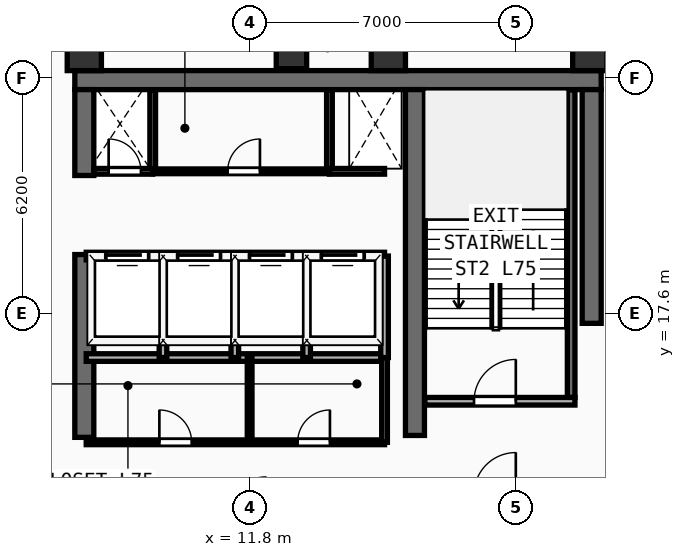
"""IFC4 building model, lengths in metres.
Left out: names, types, materials, properties, quantities, classifications, styles, units other than length and angle.
Written with IfcOpenShell. Run it as: python <this file> out.ifc"""

import sys

from ifc_helpers import new_model, si_unit, direction, frame, frame_2d, origin, origin_2d, place, context, subcontext, project, spatial, rectangle, extrude, element, fill, save


model = new_model("IFC4")
c1 = context("Model", 3, precision=1e-05, world=origin(), true_north=direction((0.0, 1.0)))
c2 = subcontext(c1, "Body", "Model", "MODEL_VIEW")
j1 = project(units=[si_unit("LENGTHUNIT", "METRE"), si_unit("PLANEANGLEUNIT", "RADIAN")], contexts=[c1])
p1 = place(None, origin())
s1 = spatial("IfcSite", under=j1, at=p1, CompositionType="ELEMENT")
p2 = place(p1, origin())
s2 = spatial("IfcBuilding", under=s1, at=p2, CompositionType="ELEMENT")
p3 = place(p2, frame((0.0, 0.0, 293.2)))
s3 = spatial("IfcBuildingStorey", under=s2, at=p3, CompositionType="ELEMENT", Elevation=293.2)
p4 = place(p3, frame((7.2, 23.75, 0.0), z_axis=(0.0, 0.0, 1.0), x_axis=(1.0, 0.0, 0.0)))
e1 = element("IfcWall", 1, at=p4, inside=s3, PredefinedType="SHEAR", context=c2, shape_type="SweptSolid", body=[
    extrude(rectangle(XDim=13.85, YDim=0.5, at=frame_2d((6.925, 0.0))), origin(), (0.0, 0.0, 1.0), 3.56),
])
p5 = place(p3, frame((7.45, 14.35, 0.0), z_axis=(0.0, 0.0, 1.0), x_axis=(0.0, 1.0, 0.0)))
e2 = element("IfcWall", 2, at=p5, inside=s3, PredefinedType="SHEAR", context=c2, shape_type="SweptSolid", body=[
    extrude(rectangle(XDim=4.81, YDim=0.5, at=frame_2d((2.405, 0.0))), origin(), (0.0, 0.0, 1.0), 3.56),
])
p6 = place(p3, frame((7.45, 21.24, 0.0), z_axis=(0.0, 0.0, 1.0), x_axis=(0.0, 1.0, 0.0)))
e3 = element("IfcWall", 3, at=p6, inside=s3, PredefinedType="SHEAR", context=c2, shape_type="SweptSolid", body=[
    extrude(rectangle(XDim=2.26, YDim=0.5, at=frame_2d((1.13, 0.0))), origin(), (0.0, 0.0, 1.0), 3.56),
])
p7 = place(p3, frame((20.8, 17.35, 0.0), z_axis=(0.0, 0.0, 1.0), x_axis=(0.0, 1.0, 0.0)))
e4 = element("IfcWall", 4, at=p7, inside=s3, PredefinedType="SHEAR", context=c2, shape_type="SweptSolid", body=[
    extrude(rectangle(XDim=6.15, YDim=0.5, at=frame_2d((3.075, 0.0))), origin(), (0.0, 0.0, 1.0), 3.56),
])
p8 = place(p3, frame((16.15, 14.4, 0.0), z_axis=(0.0, 0.0, 1.0), x_axis=(0.0, 1.0, 0.0)))
e5 = element("IfcWall", 5, at=p8, inside=s3, PredefinedType="SHEAR", context=c2, shape_type="SweptSolid", body=[
    extrude(rectangle(XDim=9.1, YDim=0.5, at=frame_2d((4.55, 0.0))), origin(), (0.0, 0.0, 1.0), 3.56),
])
for number, where, z_axis, x_axis in (
    (6, (7.45, 24.45, 0.0), (0.0, 0.0, 1.0), (1.0, 0.0, 0.0)),
    (7, (15.45, 24.45, 0.0), (0.0, 0.0, 1.0), (1.0, 0.0, 0.0)),
    (8, (20.75, 24.45, 0.0), (0.0, 0.0, 1.0), (1.0, 0.0, 0.0)),
):
    element("IfcColumn", number, at=place(p3, frame(where, z_axis=z_axis, x_axis=x_axis)), inside=s3, PredefinedType="COLUMN", context=c2, shape_type="SweptSolid", body=[
        extrude(rectangle(XDim=0.9, YDim=0.9, at=origin_2d()), origin(), (0.0, 0.0, 1.0), 3.56),
    ])
p9 = place(p3, frame((12.9, 24.45, 0.0), z_axis=(0.0, 0.0, 1.0), x_axis=(1.0, 0.0, 0.0)))
e9 = element("IfcColumn", 9, at=p9, inside=s3, PredefinedType="COLUMN", context=c2, shape_type="SweptSolid", body=[
    extrude(rectangle(XDim=0.8, YDim=0.8, at=origin_2d()), origin(), (0.0, 0.0, 1.0), 3.56),
])
p10 = place(p3, frame((27.601, 19.691, 0.0), z_axis=(0.0, 0.0, 1.0), x_axis=(-0.707120040392, 0.707093521733, 0.0)))
e10 = element("IfcWall", 10, at=p10, inside=s3, PredefinedType="SOLIDWALL", context=c2, shape_type="SweptSolid", body=[
    extrude(rectangle(XDim=9.206, YDim=0.28, at=frame_2d((4.603, 0.0))), origin(), (0.0, 0.0, 1.0), 3.56),
])
p11 = place(p3, frame((20.26, 15.4, 0.0), z_axis=(0.0, 0.0, 1.0), x_axis=(0.0, 1.0, 0.0)))
e11 = element("IfcWall", 11, at=p11, inside=s3, PredefinedType="SHEAR", context=c2, shape_type="SweptSolid", body=[
    extrude(rectangle(XDim=8.09, YDim=0.2, at=frame_2d((4.045, 0.0))), origin(), (0.0, 0.0, 1.0), 3.56),
])
p12 = place(p3, frame((16.41, 15.3, 0.0), z_axis=(0.0, 0.0, 1.0), x_axis=(1.0, 0.0, 0.0)))
e12 = element("IfcWall", 12, at=p12, inside=s3, PredefinedType="PARTITIONING", context=c2, shape_type="SweptSolid", body=[
    extrude(rectangle(XDim=3.95, YDim=0.2, at=frame_2d((1.975, 0.0))), origin(), (0.0, 0.0, 1.0), 3.56),
])
p13 = place(p12, frame((1.294, 0.0, 0.0)))
e13 = element("IfcOpeningElement", 13, at=p13, cuts=e12, PredefinedType="OPENING", context=c2, shape_type="SweptSolid", body=[
    extrude(rectangle(XDim=1.1, YDim=2.2, at=frame_2d((0.55, 1.1))), frame((0.0, 0.11, 0.0), z_axis=(0.0, -1.0, 0.0), x_axis=(1.0, 0.0, 0.0)), (0.0, 0.0, 1.0), 0.22),
])
p14 = place(p3, frame((7.5, 16.45, 0.0), z_axis=(0.0, 0.0, 1.0), x_axis=(1.0, 0.0, 0.0)))
e14 = element("IfcWall", 14, at=p14, inside=s3, PredefinedType="PARTITIONING", context=c2, shape_type="SweptSolid", body=[
    extrude(rectangle(XDim=7.85, YDim=0.2, at=frame_2d((3.925, 0.0))), origin(), (0.0, 0.0, 1.0), 3.56),
])
p15 = place(p3, frame((7.5, 14.22, 0.0), z_axis=(0.0, 0.0, 1.0), x_axis=(1.0, 0.0, 0.0)))
e15 = element("IfcWall", 15, at=p15, inside=s3, PredefinedType="PARTITIONING", context=c2, shape_type="SweptSolid", body=[
    extrude(rectangle(XDim=7.85, YDim=0.125, at=frame_2d((3.925, 0.0))), origin(), (0.0, 0.0, 1.0), 3.56),
])
p16 = place(p15, frame((1.925, 0.0, 0.0)))
e16 = element("IfcOpeningElement", 16, at=p16, cuts=e15, PredefinedType="OPENING", context=c2, shape_type="SweptSolid", body=[
    extrude(rectangle(XDim=0.85, YDim=2.15, at=frame_2d((0.425, 1.075))), frame((0.0, 0.073, 0.0), z_axis=(0.0, -1.0, 0.0), x_axis=(1.0, 0.0, 0.0)), (0.0, 0.0, 1.0), 0.145),
])
p17 = place(p15, frame((5.563, 0.0, 0.0)))
e17 = element("IfcOpeningElement", 17, at=p17, cuts=e15, PredefinedType="OPENING", context=c2, shape_type="SweptSolid", body=[
    extrude(rectangle(XDim=0.85, YDim=2.15, at=frame_2d((0.425, 1.075))), frame((0.0, 0.073, 0.0), z_axis=(0.0, -1.0, 0.0), x_axis=(1.0, 0.0, 0.0)), (0.0, 0.0, 1.0), 0.145),
])
p18 = place(p3, frame((15.35, 14.22, 0.0), z_axis=(0.0, 0.0, 1.0), x_axis=(0.0, 1.0, 0.0)))
e18 = element("IfcWall", 18, at=p18, inside=s3, PredefinedType="PARTITIONING", context=c2, shape_type="SweptSolid", body=[
    extrude(rectangle(XDim=2.23, YDim=0.15, at=frame_2d((1.115, 0.0))), origin(), (0.0, 0.0, 1.0), 3.56),
])
p19 = place(p3, frame((11.8, 14.22, 0.0), z_axis=(0.0, 0.0, 1.0), x_axis=(0.0, 1.0, 0.0)))
e19 = element("IfcWall", 19, at=p19, inside=s3, PredefinedType="PARTITIONING", context=c2, shape_type="SweptSolid", body=[
    extrude(rectangle(XDim=2.23, YDim=0.125, at=frame_2d((1.115, 0.0))), origin(), (0.0, 0.0, 1.0), 3.56),
])
p20 = place(p3, frame((7.5, 19.12, 0.0), z_axis=(0.0, 0.0, 1.0), x_axis=(1.0, 0.0, 0.0)))
e20 = element("IfcWall", 20, at=p20, inside=s3, PredefinedType="PARTITIONING", context=c2, shape_type="SweptSolid", body=[
    extrude(rectangle(XDim=7.85, YDim=0.2, at=frame_2d((3.925, 0.0))), origin(), (0.0, 0.0, 1.0), 3.56),
])
p21 = place(p20, frame((0.53, 0.0, 0.0)))
e21 = element("IfcOpeningElement", 21, at=p21, cuts=e20, PredefinedType="OPENING", context=c2, shape_type="SweptSolid", body=[
    extrude(rectangle(XDim=1.1, YDim=2.2, at=frame_2d((0.55, 1.1))), frame((0.0, 0.11, 0.0), z_axis=(0.0, -1.0, 0.0), x_axis=(1.0, 0.0, 0.0)), (0.0, 0.0, 1.0), 0.22),
])
p22 = place(p20, frame((2.42, 0.0, 0.0)))
e22 = element("IfcOpeningElement", 22, at=p22, cuts=e20, PredefinedType="OPENING", context=c2, shape_type="SweptSolid", body=[
    extrude(rectangle(XDim=1.1, YDim=2.2, at=frame_2d((0.55, 1.1))), frame((0.0, 0.11, 0.0), z_axis=(0.0, -1.0, 0.0), x_axis=(1.0, 0.0, 0.0)), (0.0, 0.0, 1.0), 0.22),
])
p23 = place(p20, frame((4.31, 0.0, 0.0)))
e23 = element("IfcOpeningElement", 23, at=p23, cuts=e20, PredefinedType="OPENING", context=c2, shape_type="SweptSolid", body=[
    extrude(rectangle(XDim=1.1, YDim=2.2, at=frame_2d((0.55, 1.1))), frame((0.0, 0.11, 0.0), z_axis=(0.0, -1.0, 0.0), x_axis=(1.0, 0.0, 0.0)), (0.0, 0.0, 1.0), 0.22),
])
p24 = place(p20, frame((6.2, 0.0, 0.0)))
e24 = element("IfcOpeningElement", 24, at=p24, cuts=e20, PredefinedType="OPENING", context=c2, shape_type="SweptSolid", body=[
    extrude(rectangle(XDim=1.1, YDim=2.2, at=frame_2d((0.55, 1.1))), frame((0.0, 0.11, 0.0), z_axis=(0.0, -1.0, 0.0), x_axis=(1.0, 0.0, 0.0)), (0.0, 0.0, 1.0), 0.22),
])
for number, where, z_axis, x_axis in (
    (25, (15.35, 16.45, 0.0), (0.0, 0.0, 1.0), (0.0, 1.0, 0.0)),
    (26, (9.52, 16.45, 0.0), (0.0, 0.0, 1.0), (0.0, 1.0, 0.0)),
    (27, (11.41, 16.45, 0.0), (0.0, 0.0, 1.0), (0.0, 1.0, 0.0)),
    (28, (13.3, 16.45, 0.0), (0.0, 0.0, 1.0), (0.0, 1.0, 0.0)),
):
    element("IfcWall", number, at=place(p3, frame(where, z_axis=z_axis, x_axis=x_axis)), inside=s3, PredefinedType="PARTITIONING", context=c2, shape_type="SweptSolid", body=[
        extrude(rectangle(XDim=2.67, YDim=0.2, at=frame_2d((1.335, 0.0))), origin(), (0.0, 0.0, 1.0), 3.56),
    ])
for number, where, z_axis, x_axis in (
    (29, (9.25, 21.35, 0.0), (0.0, 0.0, 1.0), (0.0, 1.0, 0.0)),
    (30, (13.9, 21.35, 0.0), (0.0, 0.0, 1.0), (0.0, 1.0, 0.0)),
):
    element("IfcWall", number, at=place(p3, frame(where, z_axis=z_axis, x_axis=x_axis)), inside=s3, PredefinedType="PARTITIONING", context=c2, shape_type="SweptSolid", body=[
        extrude(rectangle(XDim=2.13, YDim=0.15, at=frame_2d((1.065, 0.0))), origin(), (0.0, 0.0, 1.0), 3.56),
    ])
p25 = place(p3, frame((7.7, 21.35, 0.0), z_axis=(0.0, 0.0, 1.0), x_axis=(1.0, 0.0, 0.0)))
e31 = element("IfcWall", 31, at=p25, inside=s3, PredefinedType="PARTITIONING", context=c2, shape_type="SweptSolid", body=[
    extrude(rectangle(XDim=1.55, YDim=0.15, at=frame_2d((0.775, 0.0))), origin(), (0.0, 0.0, 1.0), 3.56),
])
p26 = place(p25, frame((0.39, 0.0, 0.0)))
e32 = element("IfcOpeningElement", 32, at=p26, cuts=e31, PredefinedType="OPENING", context=c2, shape_type="SweptSolid", body=[
    extrude(rectangle(XDim=0.85, YDim=2.15, at=frame_2d((0.425, 1.075))), frame((0.0, 0.085, 0.0), z_axis=(0.0, -1.0, 0.0), x_axis=(1.0, 0.0, 0.0)), (0.0, 0.0, 1.0), 0.17),
])
p27 = place(p3, frame((13.9, 21.35, 0.0), z_axis=(0.0, 0.0, 1.0), x_axis=(1.0, 0.0, 0.0)))
e33 = element("IfcWall", 33, at=p27, inside=s3, PredefinedType="PARTITIONING", context=c2, shape_type="SweptSolid", body=[
    extrude(rectangle(XDim=1.45, YDim=0.15, at=frame_2d((0.725, 0.0))), origin(), (0.0, 0.0, 1.0), 3.56),
])
p28 = place(p3, frame((9.25, 21.35, 0.0), z_axis=(0.0, 0.0, 1.0), x_axis=(1.0, 0.0, 0.0)))
e34 = element("IfcWall", 34, at=p28, inside=s3, PredefinedType="PARTITIONING", context=c2, shape_type="SweptSolid", body=[
    extrude(rectangle(XDim=4.65, YDim=0.125, at=frame_2d((2.325, 0.0))), origin(), (0.0, 0.0, 1.0), 3.56),
])
p29 = place(p28, frame((1.971, 0.0, 0.0)))
e35 = element("IfcOpeningElement", 35, at=p29, cuts=e34, PredefinedType="OPENING", context=c2, shape_type="SweptSolid", body=[
    extrude(rectangle(XDim=0.85, YDim=2.15, at=frame_2d((0.425, 1.075))), frame((0.0, 0.073, 0.0), z_axis=(0.0, -1.0, 0.0), x_axis=(1.0, 0.0, 0.0)), (0.0, 0.0, 1.0), 0.145),
])
p30 = place(p13, origin())
e36 = element("IfcDoor", 36, at=p30, inside=s3, OperationType="SINGLE_SWING_RIGHT", PredefinedType="DOOR", context=c2, shape_type="SweptSolid", body=[
    extrude(rectangle(XDim=1.1, YDim=2.2, at=frame_2d((0.55, 1.1))), frame((0.0, 0.025, 0.0), z_axis=(0.0, -1.0, 0.0), x_axis=(1.0, 0.0, 0.0)), (0.0, 0.0, 1.0), 0.05),
])
fill(e13, e36)
p31 = place(p16, origin())
e37 = element("IfcDoor", 37, at=p31, inside=s3, OperationType="SINGLE_SWING_LEFT", PredefinedType="DOOR", context=c2, shape_type="SweptSolid", body=[
    extrude(rectangle(XDim=0.85, YDim=2.15, at=frame_2d((0.425, 1.075))), frame((0.0, 0.025, 0.0), z_axis=(0.0, -1.0, 0.0), x_axis=(1.0, 0.0, 0.0)), (0.0, 0.0, 1.0), 0.05),
])
fill(e16, e37)
p32 = place(p17, origin())
e38 = element("IfcDoor", 38, at=p32, inside=s3, OperationType="SINGLE_SWING_RIGHT", PredefinedType="DOOR", context=c2, shape_type="SweptSolid", body=[
    extrude(rectangle(XDim=0.85, YDim=2.15, at=frame_2d((0.425, 1.075))), frame((0.0, 0.025, 0.0), z_axis=(0.0, -1.0, 0.0), x_axis=(1.0, 0.0, 0.0)), (0.0, 0.0, 1.0), 0.05),
])
fill(e17, e38)
p33 = place(p21, origin())
e39 = element("IfcDoor", 39, at=p33, inside=s3, OperationType="SLIDING_TO_LEFT", PredefinedType="DOOR", context=c2, shape_type="SweptSolid", body=[
    extrude(rectangle(XDim=1.1, YDim=2.2, at=frame_2d((0.55, 1.1))), frame((0.0, 0.025, 0.0), z_axis=(0.0, -1.0, 0.0), x_axis=(1.0, 0.0, 0.0)), (0.0, 0.0, 1.0), 0.05),
])
fill(e21, e39)
p34 = place(p22, origin())
e40 = element("IfcDoor", 40, at=p34, inside=s3, OperationType="SLIDING_TO_LEFT", PredefinedType="DOOR", context=c2, shape_type="SweptSolid", body=[
    extrude(rectangle(XDim=1.1, YDim=2.2, at=frame_2d((0.55, 1.1))), frame((0.0, 0.025, 0.0), z_axis=(0.0, -1.0, 0.0), x_axis=(1.0, 0.0, 0.0)), (0.0, 0.0, 1.0), 0.05),
])
fill(e22, e40)
p35 = place(p23, origin())
e41 = element("IfcDoor", 41, at=p35, inside=s3, OperationType="SLIDING_TO_LEFT", PredefinedType="DOOR", context=c2, shape_type="SweptSolid", body=[
    extrude(rectangle(XDim=1.1, YDim=2.2, at=frame_2d((0.55, 1.1))), frame((0.0, 0.025, 0.0), z_axis=(0.0, -1.0, 0.0), x_axis=(1.0, 0.0, 0.0)), (0.0, 0.0, 1.0), 0.05),
])
fill(e23, e41)
p36 = place(p24, origin())
e42 = element("IfcDoor", 42, at=p36, inside=s3, OperationType="SLIDING_TO_LEFT", PredefinedType="DOOR", context=c2, shape_type="SweptSolid", body=[
    extrude(rectangle(XDim=1.1, YDim=2.2, at=frame_2d((0.55, 1.1))), frame((0.0, 0.025, 0.0), z_axis=(0.0, -1.0, 0.0), x_axis=(1.0, 0.0, 0.0)), (0.0, 0.0, 1.0), 0.05),
])
fill(e24, e42)
p37 = place(p26, origin())
e43 = element("IfcDoor", 43, at=p37, inside=s3, OperationType="SINGLE_SWING_LEFT", PredefinedType="DOOR", context=c2, shape_type="SweptSolid", body=[
    extrude(rectangle(XDim=0.85, YDim=2.15, at=frame_2d((0.425, 1.075))), frame((0.0, 0.025, 0.0), z_axis=(0.0, -1.0, 0.0), x_axis=(1.0, 0.0, 0.0)), (0.0, 0.0, 1.0), 0.05),
])
fill(e32, e43)
p38 = place(p29, origin())
e44 = element("IfcDoor", 44, at=p38, inside=s3, OperationType="SINGLE_SWING_RIGHT", PredefinedType="DOOR", context=c2, shape_type="SweptSolid", body=[
    extrude(rectangle(XDim=0.85, YDim=2.15, at=frame_2d((0.425, 1.075))), frame((0.0, 0.025, 0.0), z_axis=(0.0, -1.0, 0.0), x_axis=(1.0, 0.0, 0.0)), (0.0, 0.0, 1.0), 0.05),
])
fill(e35, e44)
save(model, sys.argv[1])
